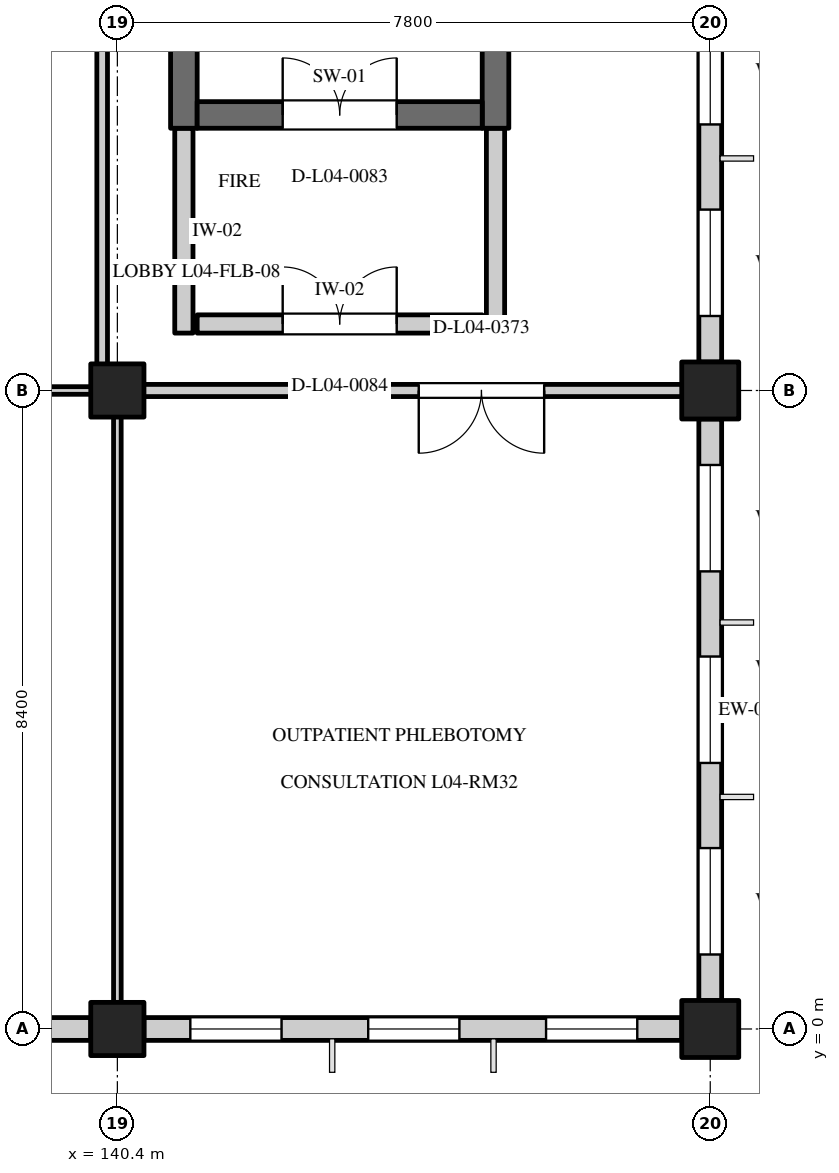
"""IFC4 building model, lengths in metres.
Left out: names, types, materials, properties, quantities, classifications, styles, units other than length and angle.
Written with IfcOpenShell. Run it as: python <this file> out.ifc"""

import sys

from ifc_helpers import new_model, si_unit, direction, frame, frame_2d, origin, origin_2d, place, context, subcontext, project, spatial, rectangle, extrude, element, fill, save


model = new_model("IFC4")
c1 = context("Model", 3, precision=1e-05, world=origin(), true_north=direction((0.0, 1.0)))
c2 = subcontext(c1, "Body", "Model", "MODEL_VIEW")
j1 = project(units=[si_unit("LENGTHUNIT", "METRE"), si_unit("PLANEANGLEUNIT", "RADIAN")], contexts=[c1])
p1 = place(None, origin())
s1 = spatial("IfcSite", under=j1, at=p1, CompositionType="ELEMENT")
p2 = place(p1, origin())
s2 = spatial("IfcBuilding", under=s1, at=p2, CompositionType="ELEMENT")
p3 = place(p2, frame((0.0, 0.0, 18.0)))
s3 = spatial("IfcBuildingStorey", under=s2, at=p3, CompositionType="ELEMENT", Elevation=18.0)
for number, where, z_axis, x_axis in (
    (1, (140.4, 0.0, 0.0), (0.0, 0.0, 1.0), (1.0, 0.0, 0.0)),
    (2, (140.4, 8.4, 0.0), (0.0, 0.0, 1.0), (1.0, 0.0, 0.0)),
):
    element("IfcColumn", number, at=place(p3, frame(where, z_axis=z_axis, x_axis=x_axis)), inside=s3, PredefinedType="COLUMN", context=c2, shape_type="SweptSolid", body=[
        extrude(rectangle(XDim=0.7, YDim=0.7, at=origin_2d()), origin(), (0.0, 0.0, 1.0), 4.2),
    ])
for number, where, z_axis, x_axis in (
    (3, (148.2, 0.0, 0.0), (0.0, 0.0, 1.0), (1.0, 0.0, 0.0)),
    (4, (148.2, 8.4, 0.0), (0.0, 0.0, 1.0), (1.0, 0.0, 0.0)),
):
    element("IfcColumn", number, at=place(p3, frame(where, z_axis=z_axis, x_axis=x_axis)), inside=s3, PredefinedType="COLUMN", context=c2, shape_type="SweptSolid", body=[
        extrude(rectangle(XDim=0.75, YDim=0.75, at=origin_2d()), origin(), (0.0, 0.0, 1.0), 4.2),
    ])
p4 = place(p3, frame((132.95, 0.0, 0.0), z_axis=(0.0, 0.0, 1.0), x_axis=(1.0, 0.0, 0.0)))
e5 = element("IfcWall", 5, at=p4, inside=s3, PredefinedType="STANDARD", context=c2, shape_type="SweptSolid", body=[
    extrude(rectangle(XDim=7.1, YDim=0.3, at=frame_2d((3.55, 0.0))), origin(), (0.0, 0.0, 1.0), 3.335),
])
p5 = place(p4, frame((0.61, 0.0, 0.8)))
e6 = element("IfcOpeningElement", 6, at=p5, cuts=e5, PredefinedType="OPENING", context=c2, shape_type="SweptSolid", body=[
    extrude(rectangle(XDim=1.2, YDim=1.55, at=frame_2d((0.6, 0.775))), frame((0.0, 0.162, 0.0), z_axis=(0.0, -1.0, 0.0), x_axis=(1.0, 0.0, 0.0)), (0.0, 0.0, 1.0), 0.324),
])
p6 = place(p4, frame((2.95, 0.0, 0.8)))
e7 = element("IfcOpeningElement", 7, at=p6, cuts=e5, PredefinedType="OPENING", context=c2, shape_type="SweptSolid", body=[
    extrude(rectangle(XDim=1.2, YDim=1.55, at=frame_2d((0.6, 0.775))), frame((0.0, 0.162, 0.0), z_axis=(0.0, -1.0, 0.0), x_axis=(1.0, 0.0, 0.0)), (0.0, 0.0, 1.0), 0.324),
])
p7 = place(p4, frame((5.29, 0.0, 0.8)))
e8 = element("IfcOpeningElement", 8, at=p7, cuts=e5, PredefinedType="OPENING", context=c2, shape_type="SweptSolid", body=[
    extrude(rectangle(XDim=1.2, YDim=1.55, at=frame_2d((0.6, 0.775))), frame((0.0, 0.162, 0.0), z_axis=(0.0, -1.0, 0.0), x_axis=(1.0, 0.0, 0.0)), (0.0, 0.0, 1.0), 0.324),
])
p8 = place(p3, frame((140.75, 0.0, 0.0), z_axis=(0.0, 0.0, 1.0), x_axis=(1.0, 0.0, 0.0)))
e9 = element("IfcWall", 9, at=p8, inside=s3, PredefinedType="STANDARD", context=c2, shape_type="SweptSolid", body=[
    extrude(rectangle(XDim=7.075, YDim=0.3, at=frame_2d((3.538, 0.0))), origin(), (0.0, 0.0, 1.0), 3.335),
])
p9 = place(p8, frame((0.61, 0.0, 0.8)))
e10 = element("IfcOpeningElement", 10, at=p9, cuts=e9, PredefinedType="OPENING", context=c2, shape_type="SweptSolid", body=[
    extrude(rectangle(XDim=1.2, YDim=1.4, at=frame_2d((0.6, 0.7))), frame((0.0, 0.162, 0.0), z_axis=(0.0, -1.0, 0.0), x_axis=(1.0, 0.0, 0.0)), (0.0, 0.0, 1.0), 0.324),
])
p10 = place(p8, frame((2.95, 0.0, 0.8)))
e11 = element("IfcOpeningElement", 11, at=p10, cuts=e9, PredefinedType="OPENING", context=c2, shape_type="SweptSolid", body=[
    extrude(rectangle(XDim=1.2, YDim=1.4, at=frame_2d((0.6, 0.7))), frame((0.0, 0.162, 0.0), z_axis=(0.0, -1.0, 0.0), x_axis=(1.0, 0.0, 0.0)), (0.0, 0.0, 1.0), 0.324),
])
p11 = place(p8, frame((5.29, 0.0, 0.8)))
e12 = element("IfcOpeningElement", 12, at=p11, cuts=e9, PredefinedType="OPENING", context=c2, shape_type="SweptSolid", body=[
    extrude(rectangle(XDim=1.2, YDim=1.4, at=frame_2d((0.6, 0.7))), frame((0.0, 0.162, 0.0), z_axis=(0.0, -1.0, 0.0), x_axis=(1.0, 0.0, 0.0)), (0.0, 0.0, 1.0), 0.324),
])
p12 = place(p3, frame((148.2, 0.375, 0.0), z_axis=(0.0, 0.0, 1.0), x_axis=(0.0, 1.0, 0.0)))
e13 = element("IfcWall", 13, at=p12, inside=s3, PredefinedType="STANDARD", context=c2, shape_type="SweptSolid", body=[
    extrude(rectangle(XDim=7.65, YDim=0.3, at=frame_2d((3.825, 0.0))), origin(), (0.0, 0.0, 1.0), 3.235),
])
p13 = place(p12, frame((0.605, 0.0, 0.8)))
e14 = element("IfcOpeningElement", 14, at=p13, cuts=e13, PredefinedType="OPENING", context=c2, shape_type="SweptSolid", body=[
    extrude(rectangle(XDim=1.4, YDim=1.6, at=frame_2d((0.7, 0.8))), frame((0.0, 0.162, 0.0), z_axis=(0.0, -1.0, 0.0), x_axis=(1.0, 0.0, 0.0)), (0.0, 0.0, 1.0), 0.324),
])
p14 = place(p12, frame((3.125, 0.0, 0.8)))
e15 = element("IfcOpeningElement", 15, at=p14, cuts=e13, PredefinedType="OPENING", context=c2, shape_type="SweptSolid", body=[
    extrude(rectangle(XDim=1.4, YDim=1.6, at=frame_2d((0.7, 0.8))), frame((0.0, 0.162, 0.0), z_axis=(0.0, -1.0, 0.0), x_axis=(1.0, 0.0, 0.0)), (0.0, 0.0, 1.0), 0.324),
])
p15 = place(p12, frame((5.645, 0.0, 0.8)))
e16 = element("IfcOpeningElement", 16, at=p15, cuts=e13, PredefinedType="OPENING", context=c2, shape_type="SweptSolid", body=[
    extrude(rectangle(XDim=1.4, YDim=1.6, at=frame_2d((0.7, 0.8))), frame((0.0, 0.162, 0.0), z_axis=(0.0, -1.0, 0.0), x_axis=(1.0, 0.0, 0.0)), (0.0, 0.0, 1.0), 0.324),
])
p16 = place(p3, frame((148.2, 8.775, 0.0), z_axis=(0.0, 0.0, 1.0), x_axis=(0.0, 1.0, 0.0)))
e17 = element("IfcWall", 17, at=p16, inside=s3, PredefinedType="STANDARD", context=c2, shape_type="SweptSolid", body=[
    extrude(rectangle(XDim=7.65, YDim=0.3, at=frame_2d((3.825, 0.0))), origin(), (0.0, 0.0, 1.0), 3.235),
])
p17 = place(p16, frame((0.605, 0.0, 0.8)))
e18 = element("IfcOpeningElement", 18, at=p17, cuts=e17, PredefinedType="OPENING", context=c2, shape_type="SweptSolid", body=[
    extrude(rectangle(XDim=1.4, YDim=1.45, at=frame_2d((0.7, 0.725))), frame((0.0, 0.162, 0.0), z_axis=(0.0, -1.0, 0.0), x_axis=(1.0, 0.0, 0.0)), (0.0, 0.0, 1.0), 0.324),
])
p18 = place(p16, frame((3.125, 0.0, 0.8)))
e19 = element("IfcOpeningElement", 19, at=p18, cuts=e17, PredefinedType="OPENING", context=c2, shape_type="SweptSolid", body=[
    extrude(rectangle(XDim=1.4, YDim=1.45, at=frame_2d((0.7, 0.725))), frame((0.0, 0.162, 0.0), z_axis=(0.0, -1.0, 0.0), x_axis=(1.0, 0.0, 0.0)), (0.0, 0.0, 1.0), 0.324),
])
p19 = place(p16, frame((5.645, 0.0, 0.8)))
e20 = element("IfcOpeningElement", 20, at=p19, cuts=e17, PredefinedType="OPENING", context=c2, shape_type="SweptSolid", body=[
    extrude(rectangle(XDim=1.4, YDim=1.45, at=frame_2d((0.7, 0.725))), frame((0.0, 0.162, 0.0), z_axis=(0.0, -1.0, 0.0), x_axis=(1.0, 0.0, 0.0)), (0.0, 0.0, 1.0), 0.324),
])
for number, where, z_axis, x_axis in (
    (21, (141.275, 11.85, 0.0), (0.0, 0.0, 1.0), (0.0, 1.0, 0.0)),
    (22, (145.375, 11.85, 0.0), (0.0, 0.0, 1.0), (0.0, 1.0, 0.0)),
):
    element("IfcWall", number, at=place(p3, frame(where, z_axis=z_axis, x_axis=x_axis)), inside=s3, PredefinedType="SHEAR", context=c2, shape_type="SweptSolid", body=[
        extrude(rectangle(XDim=10.5, YDim=0.35, at=frame_2d((5.25, 0.0))), origin(), (0.0, 0.0, 1.0), 4.2),
    ])
p20 = place(p3, frame((141.45, 12.025, 0.0), z_axis=(0.0, 0.0, 1.0), x_axis=(1.0, 0.0, 0.0)))
e23 = element("IfcWall", 23, at=p20, inside=s3, PredefinedType="SHEAR", context=c2, shape_type="SweptSolid", body=[
    extrude(rectangle(XDim=3.75, YDim=0.35, at=frame_2d((1.875, 0.0))), origin(), (0.0, 0.0, 1.0), 3.885),
])
p21 = place(p20, frame((1.125, 0.0, 0.0)))
e24 = element("IfcOpeningElement", 24, at=p21, cuts=e23, PredefinedType="OPENING", context=c2, shape_type="SweptSolid", body=[
    extrude(rectangle(XDim=1.5, YDim=2.2, at=frame_2d((0.75, 1.1))), frame((0.0, 0.187, 0.0), z_axis=(0.0, -1.0, 0.0), x_axis=(1.0, 0.0, 0.0)), (0.0, 0.0, 1.0), 0.374),
])
for number, where, z_axis, x_axis in (
    (25, (141.275, 9.155, 0.0), (0.0, 0.0, 1.0), (0.0, 1.0, 0.0)),
    (26, (145.375, 9.155, 0.0), (0.0, 0.0, 1.0), (0.0, 1.0, 0.0)),
):
    element("IfcWall", number, at=place(p3, frame(where, z_axis=z_axis, x_axis=x_axis)), inside=s3, PredefinedType="STANDARD", context=c2, shape_type="SweptSolid", body=[
        extrude(rectangle(XDim=2.695, YDim=0.24, at=frame_2d((1.348, 0.0))), origin(), (0.0, 0.0, 1.0), 3.885),
    ])
p22 = place(p3, frame((141.45, 9.275, 0.0), z_axis=(0.0, 0.0, 1.0), x_axis=(1.0, 0.0, 0.0)))
e27 = element("IfcWall", 27, at=p22, inside=s3, PredefinedType="STANDARD", context=c2, shape_type="SweptSolid", body=[
    extrude(rectangle(XDim=3.75, YDim=0.24, at=frame_2d((1.875, 0.0))), origin(), (0.0, 0.0, 1.0), 3.885),
])
p23 = place(p22, frame((1.125, 0.0, 0.0)))
e28 = element("IfcOpeningElement", 28, at=p23, cuts=e27, PredefinedType="OPENING", context=c2, shape_type="SweptSolid", body=[
    extrude(rectangle(XDim=1.5, YDim=2.2, at=frame_2d((0.75, 1.1))), frame((0.0, 0.132, 0.0), z_axis=(0.0, -1.0, 0.0), x_axis=(1.0, 0.0, 0.0)), (0.0, 0.0, 1.0), 0.264),
])
p24 = place(p3, frame((132.29, 8.4, 0.0), z_axis=(0.0, 0.0, 1.0), x_axis=(1.0, 0.0, 0.0)))
e29 = element("IfcWall", 29, at=p24, inside=s3, PredefinedType="PARTITIONING", context=c2, shape_type="SweptSolid", body=[
    extrude(rectangle(XDim=8.025, YDim=0.1, at=frame_2d((4.012, 0.0))), origin(), (0.0, 0.0, 1.0), 3.865),
])
p25 = place(p24, frame((2.964, 0.0, 0.0)))
e30 = element("IfcOpeningElement", 30, at=p25, cuts=e29, PredefinedType="OPENING", context=c2, shape_type="SweptSolid", body=[
    extrude(rectangle(XDim=1.05, YDim=2.1, at=frame_2d((0.525, 1.05))), frame((0.0, 0.062, 0.0), z_axis=(0.0, -1.0, 0.0), x_axis=(1.0, 0.0, 0.0)), (0.0, 0.0, 1.0), 0.124),
])
p26 = place(p3, frame((140.4, 0.085, 0.0), z_axis=(0.0, 0.0, 1.0), x_axis=(0.0, 1.0, 0.0)))
e31 = element("IfcWall", 31, at=p26, inside=s3, PredefinedType="PARTITIONING", context=c2, shape_type="SweptSolid", body=[
    extrude(rectangle(XDim=8.23, YDim=0.1, at=frame_2d((4.115, 0.0))), origin(), (0.0, 0.0, 1.0), 3.865),
])
p27 = place(p3, frame((140.2, 8.485, 0.0), z_axis=(0.0, 0.0, 1.0), x_axis=(0.0, 1.0, 0.0)))
e32 = element("IfcWall", 32, at=p27, inside=s3, PredefinedType="PARTITIONING", context=c2, shape_type="SweptSolid", body=[
    extrude(rectangle(XDim=16.63, YDim=0.14, at=frame_2d((8.315, 0.0))), origin(), (0.0, 0.0, 1.0), 3.865),
])
p28 = place(p3, frame((140.485, 8.4, 0.0), z_axis=(0.0, 0.0, 1.0), x_axis=(1.0, 0.0, 0.0)))
e33 = element("IfcWall", 33, at=p28, inside=s3, PredefinedType="PARTITIONING", context=c2, shape_type="SweptSolid", body=[
    extrude(rectangle(XDim=7.43, YDim=0.16, at=frame_2d((3.715, 0.0))), origin(), (0.0, 0.0, 1.0), 3.865),
])
p29 = place(p28, frame((3.88, 0.0, 0.0)))
e34 = element("IfcOpeningElement", 34, at=p29, cuts=e33, PredefinedType="OPENING", context=c2, shape_type="SweptSolid", body=[
    extrude(rectangle(XDim=1.65, YDim=2.25, at=frame_2d((0.825, 1.125))), frame((0.0, 0.092, 0.0), z_axis=(0.0, -1.0, 0.0), x_axis=(1.0, 0.0, 0.0)), (0.0, 0.0, 1.0), 0.184),
])
p30 = place(p9, origin())
e35 = element("IfcWindow", 35, at=p30, inside=s3, PartitioningType="SINGLE_PANEL", PredefinedType="WINDOW", context=c2, shape_type="SweptSolid", body=[
    extrude(rectangle(XDim=1.2, YDim=1.4, at=frame_2d((0.6, 0.7))), frame((0.0, 0.03, 0.0), z_axis=(0.0, -1.0, 0.0), x_axis=(1.0, 0.0, 0.0)), (0.0, 0.0, 1.0), 0.06),
])
fill(e10, e35)
p31 = place(p10, origin())
e36 = element("IfcWindow", 36, at=p31, inside=s3, PartitioningType="SINGLE_PANEL", PredefinedType="WINDOW", context=c2, shape_type="SweptSolid", body=[
    extrude(rectangle(XDim=1.2, YDim=1.4, at=frame_2d((0.6, 0.7))), frame((0.0, 0.03, 0.0), z_axis=(0.0, -1.0, 0.0), x_axis=(1.0, 0.0, 0.0)), (0.0, 0.0, 1.0), 0.06),
])
fill(e11, e36)
p32 = place(p11, origin())
e37 = element("IfcWindow", 37, at=p32, inside=s3, PartitioningType="SINGLE_PANEL", PredefinedType="WINDOW", context=c2, shape_type="SweptSolid", body=[
    extrude(rectangle(XDim=1.2, YDim=1.4, at=frame_2d((0.6, 0.7))), frame((0.0, 0.03, 0.0), z_axis=(0.0, -1.0, 0.0), x_axis=(1.0, 0.0, 0.0)), (0.0, 0.0, 1.0), 0.06),
])
fill(e12, e37)
p33 = place(p13, origin())
e38 = element("IfcWindow", 38, at=p33, inside=s3, PartitioningType="SINGLE_PANEL", PredefinedType="WINDOW", context=c2, shape_type="SweptSolid", body=[
    extrude(rectangle(XDim=1.4, YDim=1.6, at=frame_2d((0.7, 0.8))), frame((0.0, 0.03, 0.0), z_axis=(0.0, -1.0, 0.0), x_axis=(1.0, 0.0, 0.0)), (0.0, 0.0, 1.0), 0.06),
])
fill(e14, e38)
p34 = place(p14, origin())
e39 = element("IfcWindow", 39, at=p34, inside=s3, PartitioningType="SINGLE_PANEL", PredefinedType="WINDOW", context=c2, shape_type="SweptSolid", body=[
    extrude(rectangle(XDim=1.4, YDim=1.6, at=frame_2d((0.7, 0.8))), frame((0.0, 0.03, 0.0), z_axis=(0.0, -1.0, 0.0), x_axis=(1.0, 0.0, 0.0)), (0.0, 0.0, 1.0), 0.06),
])
fill(e15, e39)
p35 = place(p15, origin())
e40 = element("IfcWindow", 40, at=p35, inside=s3, PartitioningType="SINGLE_PANEL", PredefinedType="WINDOW", context=c2, shape_type="SweptSolid", body=[
    extrude(rectangle(XDim=1.4, YDim=1.6, at=frame_2d((0.7, 0.8))), frame((0.0, 0.03, 0.0), z_axis=(0.0, -1.0, 0.0), x_axis=(1.0, 0.0, 0.0)), (0.0, 0.0, 1.0), 0.06),
])
fill(e16, e40)
p36 = place(p17, origin())
e41 = element("IfcWindow", 41, at=p36, inside=s3, PartitioningType="SINGLE_PANEL", PredefinedType="WINDOW", context=c2, shape_type="SweptSolid", body=[
    extrude(rectangle(XDim=1.4, YDim=1.45, at=frame_2d((0.7, 0.725))), frame((0.0, 0.03, 0.0), z_axis=(0.0, -1.0, 0.0), x_axis=(1.0, 0.0, 0.0)), (0.0, 0.0, 1.0), 0.06),
])
fill(e18, e41)
p37 = place(p18, origin())
e42 = element("IfcWindow", 42, at=p37, inside=s3, PartitioningType="SINGLE_PANEL", PredefinedType="WINDOW", context=c2, shape_type="SweptSolid", body=[
    extrude(rectangle(XDim=1.4, YDim=1.45, at=frame_2d((0.7, 0.725))), frame((0.0, 0.03, 0.0), z_axis=(0.0, -1.0, 0.0), x_axis=(1.0, 0.0, 0.0)), (0.0, 0.0, 1.0), 0.06),
])
fill(e19, e42)
p38 = place(p21, origin())
e43 = element("IfcDoor", 43, at=p38, inside=s3, OperationType="DOUBLE_DOOR_SINGLE_SWING", PredefinedType="DOOR", context=c2, shape_type="SweptSolid", body=[
    extrude(rectangle(XDim=1.5, YDim=2.2, at=frame_2d((0.75, 1.1))), frame((0.0, 0.025, 0.0), z_axis=(0.0, -1.0, 0.0), x_axis=(1.0, 0.0, 0.0)), (0.0, 0.0, 1.0), 0.05),
])
fill(e24, e43)
p39 = place(p23, origin())
e44 = element("IfcDoor", 44, at=p39, inside=s3, OperationType="DOUBLE_DOOR_SINGLE_SWING", PredefinedType="DOOR", context=c2, shape_type="SweptSolid", body=[
    extrude(rectangle(XDim=1.5, YDim=2.2, at=frame_2d((0.75, 1.1))), frame((0.0, 0.025, 0.0), z_axis=(0.0, -1.0, 0.0), x_axis=(1.0, 0.0, 0.0)), (0.0, 0.0, 1.0), 0.05),
])
fill(e28, e44)
p40 = place(p29, frame((1.65, 0.0, 0.0), z_axis=(0.0, 0.0, 1.0), x_axis=(-1.0, 0.0, 0.0)))
e45 = element("IfcDoor", 45, at=p40, inside=s3, OperationType="DOUBLE_DOOR_SINGLE_SWING", PredefinedType="DOOR", context=c2, shape_type="SweptSolid", body=[
    extrude(rectangle(XDim=1.65, YDim=2.25, at=frame_2d((0.825, 1.125))), frame((0.0, 0.025, 0.0), z_axis=(0.0, -1.0, 0.0), x_axis=(1.0, 0.0, 0.0)), (0.0, 0.0, 1.0), 0.05),
])
fill(e34, e45)
save(model, sys.argv[1])
